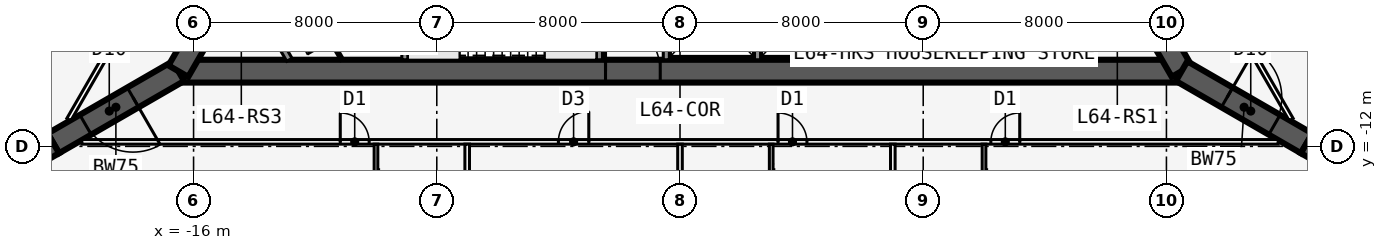
"""IFC4 building model, lengths in metres.
Left out: names, types, materials, properties, quantities, classifications, styles, units other than length and angle.
Written with IfcOpenShell. Run it as: python <this file> out.ifc"""

import sys

from ifc_helpers import new_model, si_unit, direction, frame, frame_2d, origin, place, context, subcontext, project, spatial, polyline, rectangle, outline, extrude, element, fill, save


model = new_model("IFC4")
c1 = context("Model", 3, precision=1e-05, world=origin(), true_north=direction((0.0, 1.0)))
c2 = subcontext(c1, "Body", "Model", "MODEL_VIEW")
j1 = project(units=[si_unit("LENGTHUNIT", "METRE"), si_unit("PLANEANGLEUNIT", "RADIAN")], contexts=[c1])
p1 = place(None, origin())
s1 = spatial("IfcSite", under=j1, at=p1, CompositionType="ELEMENT")
p2 = place(p1, origin())
s2 = spatial("IfcBuilding", under=s1, at=p2, CompositionType="ELEMENT")
p3 = place(p2, frame((0.0, 0.0, 242.9)))
s3 = spatial("IfcBuildingStorey", under=s2, at=p3, CompositionType="ELEMENT", Elevation=242.9)
p4 = place(p3, frame((-16.5, -9.526, 0.0), z_axis=(0.0, 0.0, 1.0), x_axis=(1.0, 0.0, 0.0)))
e1 = element("IfcWall", 1, at=p4, inside=s3, PredefinedType="SHEAR", context=c2, shape_type="SweptSolid", body=[
    extrude(rectangle(XDim=33.0, YDim=0.75, at=frame_2d((16.5, 0.0))), origin(), (0.0, 0.0, 1.0), 3.6),
])
p5 = place(p4, frame((14.05, 0.0, 0.0)))
e2 = element("IfcOpeningElement", 2, at=p5, cuts=e1, PredefinedType="OPENING", context=c2, shape_type="SweptSolid", body=[
    extrude(rectangle(XDim=1.8, YDim=2.13, at=frame_2d((0.9, 1.065))), frame((0.0, 0.385, 0.0), z_axis=(0.0, -1.0, 0.0), x_axis=(1.0, 0.0, 0.0)), (0.0, 0.0, 1.0), 0.77),
])
p6 = place(p3, frame((-9.05, -5.951, 0.0), z_axis=(0.0, 0.0, 1.0), x_axis=(0.0, -1.0, 0.0)))
e3 = element("IfcWall", 3, at=p6, inside=s3, PredefinedType="SOLIDWALL", context=c2, shape_type="SweptSolid", body=[
    extrude(rectangle(XDim=3.2, YDim=0.2, at=frame_2d((1.6, 0.0))), origin(), (0.0, 0.0, 1.0), 3.435),
])
p7 = place(p3, frame((-2.65, -5.951, 0.0), z_axis=(0.0, 0.0, 1.0), x_axis=(0.0, -1.0, 0.0)))
e4 = element("IfcWall", 4, at=p7, inside=s3, PredefinedType="SOLIDWALL", context=c2, shape_type="SweptSolid", body=[
    extrude(rectangle(XDim=3.2, YDim=0.2, at=frame_2d((1.6, 0.0))), origin(), (0.0, 0.0, 1.0), 3.435),
])
p8 = place(p7, frame((1.6, 0.0, 0.0)))
e5 = element("IfcOpeningElement", 5, at=p8, cuts=e4, PredefinedType="OPENING", context=c2, shape_type="SweptSolid", body=[
    extrude(rectangle(XDim=1.0, YDim=2.13, at=frame_2d((0.5, 1.065))), frame((0.0, 0.11, 0.0), z_axis=(0.0, -1.0, 0.0), x_axis=(1.0, 0.0, 0.0)), (0.0, 0.0, 1.0), 0.22),
])
for number, where, z_axis, x_axis in (
    (6, (-0.45, -5.951, 0.0), (0.0, 0.0, 1.0), (0.0, -1.0, 0.0)),
    (7, (2.55, -5.951, 0.0), (0.0, 0.0, 1.0), (0.0, -1.0, 0.0)),
    (8, (5.55, -5.951, 0.0), (0.0, 0.0, 1.0), (0.0, -1.0, 0.0)),
    (9, (8.45, -5.951, 0.0), (0.0, 0.0, 1.0), (0.0, -1.0, 0.0)),
):
    element("IfcWall", number, at=place(p3, frame(where, z_axis=z_axis, x_axis=x_axis)), inside=s3, PredefinedType="SOLIDWALL", context=c2, shape_type="SweptSolid", body=[
        extrude(rectangle(XDim=3.2, YDim=0.2, at=frame_2d((1.6, 0.0))), origin(), (0.0, 0.0, 1.0), 3.435),
    ])
p9 = place(p3, frame((16.5, -9.526, 0.0), z_axis=(0.0, 0.0, 1.0), x_axis=(-0.499999749417, 0.866025548458, 0.0)))
e10 = element("IfcWall", 10, at=p9, inside=s3, PredefinedType="SHEAR", context=c2, shape_type="SweptSolid", body=[
    extrude(rectangle(XDim=33.0, YDim=0.75, at=frame_2d((16.5, 0.0))), origin(), (0.0, 0.0, 1.0), 3.6),
])
p10 = place(p9, frame((14.15, 0.0, 0.0)))
e11 = element("IfcOpeningElement", 11, at=p10, cuts=e10, PredefinedType="OPENING", context=c2, shape_type="SweptSolid", body=[
    extrude(rectangle(XDim=1.8, YDim=2.13, at=frame_2d((0.9, 1.065))), frame((0.0, 0.385, 0.0), z_axis=(0.0, -1.0, 0.0), x_axis=(1.0, 0.0, 0.0)), (0.0, 0.0, 1.0), 0.77),
])
p11 = place(p9, frame((12.6, 0.0, 0.0)))
e12 = element("IfcOpeningElement", 12, at=p11, cuts=e10, PredefinedType="OPENING", context=c2, shape_type="SweptSolid", body=[
    extrude(rectangle(XDim=1.0, YDim=2.13, at=frame_2d((0.5, 1.065))), frame((0.0, 0.385, 0.0), z_axis=(0.0, -1.0, 0.0), x_axis=(1.0, 0.0, 0.0)), (0.0, 0.0, 1.0), 0.77),
])
p12 = place(p3, frame((0.0, 19.052, 0.0), z_axis=(0.0, 0.0, 1.0), x_axis=(-0.499999749417, -0.866025548458, 0.0)))
e13 = element("IfcWall", 13, at=p12, inside=s3, PredefinedType="SHEAR", context=c2, shape_type="SweptSolid", body=[
    extrude(rectangle(XDim=33.0, YDim=0.75, at=frame_2d((16.5, 0.0))), origin(), (0.0, 0.0, 1.0), 3.6),
])
p13 = place(p12, frame((14.15, 0.0, 0.0)))
e14 = element("IfcOpeningElement", 14, at=p13, cuts=e13, PredefinedType="OPENING", context=c2, shape_type="SweptSolid", body=[
    extrude(rectangle(XDim=1.8, YDim=2.13, at=frame_2d((0.9, 1.065))), frame((0.0, 0.385, 0.0), z_axis=(0.0, -1.0, 0.0), x_axis=(1.0, 0.0, 0.0)), (0.0, 0.0, 1.0), 0.77),
])
p14 = place(p12, frame((12.6, 0.0, 0.0)))
e15 = element("IfcOpeningElement", 15, at=p14, cuts=e13, PredefinedType="OPENING", context=c2, shape_type="SweptSolid", body=[
    extrude(rectangle(XDim=1.0, YDim=2.13, at=frame_2d((0.5, 1.065))), frame((0.0, 0.385, 0.0), z_axis=(0.0, -1.0, 0.0), x_axis=(1.0, 0.0, 0.0)), (0.0, 0.0, 1.0), 0.77),
])
p15 = place(p3, frame((16.5, -9.526, 0.0), z_axis=(0.0, 0.0, 1.0), x_axis=(0.866031398331, -0.499989616998, 0.0)))
e16 = element("IfcWall", 16, at=p15, inside=s3, PredefinedType="SHEAR", context=c2, shape_type="SweptSolid", body=[
    extrude(rectangle(XDim=4.746, YDim=0.75, at=frame_2d((2.373, 0.0))), origin(), (0.0, 0.0, 1.0), 3.6),
])
p16 = place(p15, frame((1.725, 0.0, 0.0)))
e17 = element("IfcOpeningElement", 17, at=p16, cuts=e16, PredefinedType="OPENING", context=c2, shape_type="SweptSolid", body=[
    extrude(rectangle(XDim=1.8, YDim=2.13, at=frame_2d((0.9, 1.065))), frame((0.0, 0.385, 0.0), z_axis=(0.0, -1.0, 0.0), x_axis=(1.0, 0.0, 0.0)), (0.0, 0.0, 1.0), 0.77),
])
p17 = place(p3, frame((20.61, -11.899, 0.0), z_axis=(0.0, 0.0, 1.0), x_axis=(0.866009537788, -0.500027479704, 0.0)))
e18 = element("IfcWall", 18, at=p17, inside=s3, PredefinedType="SHEAR", context=c2, shape_type="SweptSolid", body=[
    extrude(rectangle(XDim=1.155, YDim=0.75, at=frame_2d((0.577, 0.0))), origin(), (0.0, 0.0, 1.0), 3.6),
])
p18 = place(p3, frame((-16.5, -9.526, 0.0), z_axis=(0.0, 0.0, 1.0), x_axis=(-0.866031398331, -0.499989616998, 0.0)))
e19 = element("IfcWall", 19, at=p18, inside=s3, PredefinedType="SHEAR", context=c2, shape_type="SweptSolid", body=[
    extrude(rectangle(XDim=4.746, YDim=0.75, at=frame_2d((2.373, 0.0))), origin(), (0.0, 0.0, 1.0), 3.6),
])
p19 = place(p18, frame((1.725, 0.0, 0.0)))
e20 = element("IfcOpeningElement", 20, at=p19, cuts=e19, PredefinedType="OPENING", context=c2, shape_type="SweptSolid", body=[
    extrude(rectangle(XDim=1.8, YDim=2.13, at=frame_2d((0.9, 1.065))), frame((0.0, 0.385, 0.0), z_axis=(0.0, -1.0, 0.0), x_axis=(1.0, 0.0, 0.0)), (0.0, 0.0, 1.0), 0.77),
])
p20 = place(p3, frame((-20.61, -11.899, 0.0), z_axis=(0.0, 0.0, 1.0), x_axis=(-0.866009537788, -0.500027479704, 0.0)))
e21 = element("IfcWall", 21, at=p20, inside=s3, PredefinedType="SHEAR", context=c2, shape_type="SweptSolid", body=[
    extrude(rectangle(XDim=1.155, YDim=0.75, at=frame_2d((0.577, 0.0))), origin(), (0.0, 0.0, 1.0), 3.6),
])
p21 = place(p3, frame((18.46, -15.924, 0.0), z_axis=(0.0, 0.0, 1.0), x_axis=(0.707081252484, 0.707132308968, 0.0)))
e22 = element("IfcWall", 22, at=p21, inside=s3, PredefinedType="SOLIDWALL", context=c2, shape_type="SweptSolid", body=[
    extrude(outline(polyline([(4.782, 0.225), (4.723, 0.225), (4.303, 0.113), (4.273, 0.225), (0.0, 0.225), (0.0, -0.225), (4.782, -0.225), (4.782, 0.225)])), origin(), (0.0, 0.0, 1.0), 3.435),
])
p22 = place(p21, frame((0.711, 0.0, 0.45)))
e23 = element("IfcOpeningElement", 23, at=p22, cuts=e22, PredefinedType="OPENING", context=c2, shape_type="SweptSolid", body=[
    extrude(rectangle(XDim=3.0, YDim=2.6, at=frame_2d((1.5, 1.3))), frame((0.0, 0.235, 0.0), z_axis=(0.0, -1.0, 0.0), x_axis=(1.0, 0.0, 0.0)), (0.0, 0.0, 1.0), 0.47),
])
p23 = place(p3, frame((-21.841, -12.542, 0.0), z_axis=(0.0, 0.0, 1.0), x_axis=(0.707081252484, -0.707132308968, 0.0)))
e24 = element("IfcWall", 24, at=p23, inside=s3, PredefinedType="SOLIDWALL", context=c2, shape_type="SweptSolid", body=[
    extrude(outline(polyline([(4.782, 0.225), (0.509, 0.225), (0.479, 0.113), (0.059, 0.225), (0.0, 0.225), (0.0, -0.225), (4.782, -0.225), (4.782, 0.225)])), origin(), (0.0, 0.0, 1.0), 3.435),
])
p24 = place(p23, frame((1.07, 0.0, 0.45)))
e25 = element("IfcOpeningElement", 25, at=p24, cuts=e24, PredefinedType="OPENING", context=c2, shape_type="SweptSolid", body=[
    extrude(rectangle(XDim=3.0, YDim=2.6, at=frame_2d((1.5, 1.3))), frame((0.0, 0.235, 0.0), z_axis=(0.0, -1.0, 0.0), x_axis=(1.0, 0.0, 0.0)), (0.0, 0.0, 1.0), 0.47),
])
p25 = place(p3, frame((-19.677, -11.851, 0.0), z_axis=(0.0, 0.0, 1.0), x_axis=(1.0, 0.0, 0.0)))
e26 = element("IfcWall", 26, at=p25, inside=s3, PredefinedType="PARTITIONING", context=c2, shape_type="SweptSolid", body=[
    extrude(rectangle(XDim=39.354, YDim=0.15, at=frame_2d((19.677, 0.0))), origin(), (0.0, 0.0, 1.0), 3.435),
])
p26 = place(p25, frame((8.502, 0.0, 0.0)))
e27 = element("IfcOpeningElement", 27, at=p26, cuts=e26, PredefinedType="OPENING", context=c2, shape_type="SweptSolid", body=[
    extrude(rectangle(XDim=0.95, YDim=2.13, at=frame_2d((0.475, 1.065))), frame((0.0, 0.085, 0.0), z_axis=(0.0, -1.0, 0.0), x_axis=(1.0, 0.0, 0.0)), (0.0, 0.0, 1.0), 0.17),
])
p27 = place(p25, frame((15.677, 0.0, 0.0)))
e28 = element("IfcOpeningElement", 28, at=p27, cuts=e26, PredefinedType="OPENING", context=c2, shape_type="SweptSolid", body=[
    extrude(rectangle(XDim=1.0, YDim=2.13, at=frame_2d((0.5, 1.065))), frame((0.0, 0.085, 0.0), z_axis=(0.0, -1.0, 0.0), x_axis=(1.0, 0.0, 0.0)), (0.0, 0.0, 1.0), 0.17),
])
p28 = place(p25, frame((22.902, 0.0, 0.0)))
e29 = element("IfcOpeningElement", 29, at=p28, cuts=e26, PredefinedType="OPENING", context=c2, shape_type="SweptSolid", body=[
    extrude(rectangle(XDim=0.95, YDim=2.13, at=frame_2d((0.475, 1.065))), frame((0.0, 0.085, 0.0), z_axis=(0.0, -1.0, 0.0), x_axis=(1.0, 0.0, 0.0)), (0.0, 0.0, 1.0), 0.17),
])
p29 = place(p25, frame((29.902, 0.0, 0.0)))
e30 = element("IfcOpeningElement", 30, at=p29, cuts=e26, PredefinedType="OPENING", context=c2, shape_type="SweptSolid", body=[
    extrude(rectangle(XDim=0.95, YDim=2.13, at=frame_2d((0.475, 1.065))), frame((0.0, 0.085, 0.0), z_axis=(0.0, -1.0, 0.0), x_axis=(1.0, 0.0, 0.0)), (0.0, 0.0, 1.0), 0.17),
])
p30 = place(p3, frame((-7.0, -11.926, 0.0), z_axis=(0.0, 0.0, 1.0), x_axis=(0.0, -1.0, 0.0)))
e31 = element("IfcWall", 31, at=p30, inside=s3, PredefinedType="PARTITIONING", context=c2, shape_type="SweptSolid", body=[
    extrude(rectangle(XDim=6.609, YDim=0.15, at=frame_2d((3.304, 0.0))), origin(), (0.0, 0.0, 1.0), 2.678),
])
p31 = place(p3, frame((0.0, -11.926, 0.0), z_axis=(0.0, 0.0, 1.0), x_axis=(0.0, -1.0, 0.0)))
e32 = element("IfcWall", 32, at=p31, inside=s3, PredefinedType="PARTITIONING", context=c2, shape_type="SweptSolid", body=[
    extrude(rectangle(XDim=6.854, YDim=0.15, at=frame_2d((3.427, 0.0))), origin(), (0.0, 0.0, 1.0), 2.678),
])
p32 = place(p3, frame((7.0, -11.926, 0.0), z_axis=(0.0, 0.0, 1.0), x_axis=(0.0, -1.0, 0.0)))
e33 = element("IfcWall", 33, at=p32, inside=s3, PredefinedType="PARTITIONING", context=c2, shape_type="SweptSolid", body=[
    extrude(rectangle(XDim=6.609, YDim=0.15, at=frame_2d((3.304, 0.0))), origin(), (0.0, 0.0, 1.0), 2.678),
])
p33 = place(p3, frame((-10.0, -11.926, 0.0), z_axis=(0.0, 0.0, 1.0), x_axis=(0.0, -1.0, 0.0)))
e34 = element("IfcWall", 34, at=p33, inside=s3, PredefinedType="PLUMBINGWALL", context=c2, shape_type="SweptSolid", body=[
    extrude(rectangle(XDim=2.74, YDim=0.12, at=frame_2d((1.37, 0.0))), origin(), (0.0, 0.0, 1.0), 3.435),
])
p34 = place(p33, frame((1.55, 0.0, 0.0)))
e35 = element("IfcOpeningElement", 35, at=p34, cuts=e34, PredefinedType="OPENING", context=c2, shape_type="SweptSolid", body=[
    extrude(rectangle(XDim=0.9, YDim=2.13, at=frame_2d((0.45, 1.065))), frame((0.0, 0.07, 0.0), z_axis=(0.0, -1.0, 0.0), x_axis=(1.0, 0.0, 0.0)), (0.0, 0.0, 1.0), 0.14),
])
p35 = place(p3, frame((3.0, -11.926, 0.0), z_axis=(0.0, 0.0, 1.0), x_axis=(0.0, -1.0, 0.0)))
e36 = element("IfcWall", 36, at=p35, inside=s3, PredefinedType="PLUMBINGWALL", context=c2, shape_type="SweptSolid", body=[
    extrude(rectangle(XDim=2.74, YDim=0.12, at=frame_2d((1.37, 0.0))), origin(), (0.0, 0.0, 1.0), 3.435),
])
p36 = place(p35, frame((1.55, 0.0, 0.0)))
e37 = element("IfcOpeningElement", 37, at=p36, cuts=e36, PredefinedType="OPENING", context=c2, shape_type="SweptSolid", body=[
    extrude(rectangle(XDim=0.9, YDim=2.13, at=frame_2d((0.45, 1.065))), frame((0.0, 0.07, 0.0), z_axis=(0.0, -1.0, 0.0), x_axis=(1.0, 0.0, 0.0)), (0.0, 0.0, 1.0), 0.14),
])
p37 = place(p3, frame((10.0, -11.926, 0.0), z_axis=(0.0, 0.0, 1.0), x_axis=(0.0, -1.0, 0.0)))
e38 = element("IfcWall", 38, at=p37, inside=s3, PredefinedType="PLUMBINGWALL", context=c2, shape_type="SweptSolid", body=[
    extrude(rectangle(XDim=2.74, YDim=0.12, at=frame_2d((1.37, 0.0))), origin(), (0.0, 0.0, 1.0), 3.435),
])
p38 = place(p37, frame((1.55, 0.0, 0.0)))
e39 = element("IfcOpeningElement", 39, at=p38, cuts=e38, PredefinedType="OPENING", context=c2, shape_type="SweptSolid", body=[
    extrude(rectangle(XDim=0.9, YDim=2.13, at=frame_2d((0.45, 1.065))), frame((0.0, 0.07, 0.0), z_axis=(0.0, -1.0, 0.0), x_axis=(1.0, 0.0, 0.0)), (0.0, 0.0, 1.0), 0.14),
])
p39 = place(p3, frame((20.102, -11.115, 0.0), z_axis=(0.0, 0.0, 1.0), x_axis=(-0.500001960654, 0.866024271797, 0.0)))
e40 = element("IfcWall", 40, at=p39, inside=s3, PredefinedType="PARTITIONING", context=c2, shape_type="SweptSolid", body=[
    extrude(rectangle(XDim=12.677, YDim=0.15, at=frame_2d((6.339, 0.0))), origin(), (0.0, 0.0, 1.0), 3.435),
])
p40 = place(p39, frame((8.502, 0.0, 0.0)))
e41 = element("IfcOpeningElement", 41, at=p40, cuts=e40, PredefinedType="OPENING", context=c2, shape_type="SweptSolid", body=[
    extrude(rectangle(XDim=0.95, YDim=2.13, at=frame_2d((0.475, 1.065))), frame((0.0, 0.085, 0.0), z_axis=(0.0, -1.0, 0.0), x_axis=(1.0, 0.0, 0.0)), (0.0, 0.0, 1.0), 0.17),
])
p41 = place(p3, frame((-0.425, 22.966, 0.0), z_axis=(0.0, 0.0, 1.0), x_axis=(-0.500000265775, -0.866025250339, 0.0)))
e42 = element("IfcWall", 42, at=p41, inside=s3, PredefinedType="PARTITIONING", context=c2, shape_type="SweptSolid", body=[
    extrude(rectangle(XDim=39.354, YDim=0.15, at=frame_2d((19.677, 0.0))), origin(), (0.0, 0.0, 1.0), 3.435),
])
p42 = place(p41, frame((8.502, 0.0, 0.0)))
e43 = element("IfcOpeningElement", 43, at=p42, cuts=e42, PredefinedType="OPENING", context=c2, shape_type="SweptSolid", body=[
    extrude(rectangle(XDim=0.95, YDim=2.13, at=frame_2d((0.475, 1.065))), frame((0.0, 0.085, 0.0), z_axis=(0.0, -1.0, 0.0), x_axis=(1.0, 0.0, 0.0)), (0.0, 0.0, 1.0), 0.17),
])
p43 = place(p41, frame((15.902, 0.0, 0.0)))
e44 = element("IfcOpeningElement", 44, at=p43, cuts=e42, PredefinedType="OPENING", context=c2, shape_type="SweptSolid", body=[
    extrude(rectangle(XDim=0.95, YDim=2.13, at=frame_2d((0.475, 1.065))), frame((0.0, 0.085, 0.0), z_axis=(0.0, -1.0, 0.0), x_axis=(1.0, 0.0, 0.0)), (0.0, 0.0, 1.0), 0.17),
])
p44 = place(p41, frame((22.902, 0.0, 0.0)))
e45 = element("IfcOpeningElement", 45, at=p44, cuts=e42, PredefinedType="OPENING", context=c2, shape_type="SweptSolid", body=[
    extrude(rectangle(XDim=0.95, YDim=2.13, at=frame_2d((0.475, 1.065))), frame((0.0, 0.085, 0.0), z_axis=(0.0, -1.0, 0.0), x_axis=(1.0, 0.0, 0.0)), (0.0, 0.0, 1.0), 0.17),
])
p45 = place(p41, frame((29.902, 0.0, 0.0)))
e46 = element("IfcOpeningElement", 46, at=p45, cuts=e42, PredefinedType="OPENING", context=c2, shape_type="SweptSolid", body=[
    extrude(rectangle(XDim=0.95, YDim=2.13, at=frame_2d((0.475, 1.065))), frame((0.0, 0.085, 0.0), z_axis=(0.0, -1.0, 0.0), x_axis=(1.0, 0.0, 0.0)), (0.0, 0.0, 1.0), 0.17),
])
p46 = place(p3, frame((14.349, -6.551, 0.0), z_axis=(0.0, 0.0, 1.0), x_axis=(-0.499952404951, -0.866052881055, 0.0)))
e47 = element("IfcWall", 47, at=p46, inside=s3, PredefinedType="SOLIDWALL", context=c2, shape_type="SweptSolid", body=[
    extrude(rectangle(XDim=3.002, YDim=0.2, at=frame_2d((1.501, 0.0))), origin(), (0.0, 0.0, 1.0), 3.435),
])
p47 = place(p3, frame((12.964, -4.151, 0.0), z_axis=(0.0, 0.0, 1.0), x_axis=(-0.500027479704, -0.866009537788, 0.0)))
e48 = element("IfcWall", 48, at=p47, inside=s3, PredefinedType="PARTITIONING", context=c2, shape_type="SweptSolid", body=[
    extrude(rectangle(XDim=5.774, YDim=0.1, at=frame_2d((2.887, 0.0))), origin(), (0.0, 0.0, 1.0), 3.435),
])
p48 = place(p47, frame((2.437, 0.0, 0.0)))
e49 = element("IfcOpeningElement", 49, at=p48, cuts=e48, PredefinedType="OPENING", context=c2, shape_type="SweptSolid", body=[
    extrude(rectangle(XDim=0.9, YDim=2.13, at=frame_2d((0.45, 1.065))), frame((0.0, 0.06, 0.0), z_axis=(0.0, -1.0, 0.0), x_axis=(1.0, 0.0, 0.0)), (0.0, 0.0, 1.0), 0.12),
])
p49 = place(p3, frame((-12.848, -9.151, 0.0), z_axis=(0.0, 0.0, 1.0), x_axis=(-0.499952404951, 0.866052881055, 0.0)))
e50 = element("IfcWall", 50, at=p49, inside=s3, PredefinedType="SOLIDWALL", context=c2, shape_type="SweptSolid", body=[
    extrude(rectangle(XDim=3.002, YDim=0.2, at=frame_2d((1.501, 0.0))), origin(), (0.0, 0.0, 1.0), 3.435),
])
p50 = place(p3, frame((-11.116, -9.151, 0.0), z_axis=(0.0, 0.0, 1.0), x_axis=(-0.499999210213, 0.866025859768, 0.0)))
e51 = element("IfcWall", 51, at=p50, inside=s3, PredefinedType="PARTITIONING", context=c2, shape_type="SweptSolid", body=[
    extrude(rectangle(XDim=4.734, YDim=0.1, at=frame_2d((2.367, 0.0))), origin(), (0.0, 0.0, 1.0), 3.435),
])
p51 = place(p50, frame((0.734, 0.0, 0.0)))
e52 = element("IfcOpeningElement", 52, at=p51, cuts=e51, PredefinedType="OPENING", context=c2, shape_type="SweptSolid", body=[
    extrude(rectangle(XDim=0.9, YDim=2.13, at=frame_2d((0.45, 1.065))), frame((0.0, 0.06, 0.0), z_axis=(0.0, -1.0, 0.0), x_axis=(1.0, 0.0, 0.0)), (0.0, 0.0, 1.0), 0.12),
])
p52 = place(p26, origin())
e53 = element("IfcDoor", 53, at=p52, inside=s3, OperationType="SINGLE_SWING_LEFT", PredefinedType="DOOR", context=c2, shape_type="SweptSolid", body=[
    extrude(rectangle(XDim=0.95, YDim=2.13, at=frame_2d((0.475, 1.065))), frame((0.0, 0.025, 0.0), z_axis=(0.0, -1.0, 0.0), x_axis=(1.0, 0.0, 0.0)), (0.0, 0.0, 1.0), 0.05),
])
fill(e27, e53)
p53 = place(p27, origin())
e54 = element("IfcDoor", 54, at=p53, inside=s3, OperationType="SINGLE_SWING_RIGHT", PredefinedType="DOOR", context=c2, shape_type="SweptSolid", body=[
    extrude(rectangle(XDim=1.0, YDim=2.13, at=frame_2d((0.5, 1.065))), frame((0.0, 0.025, 0.0), z_axis=(0.0, -1.0, 0.0), x_axis=(1.0, 0.0, 0.0)), (0.0, 0.0, 1.0), 0.05),
])
fill(e28, e54)
p54 = place(p28, origin())
e55 = element("IfcDoor", 55, at=p54, inside=s3, OperationType="SINGLE_SWING_LEFT", PredefinedType="DOOR", context=c2, shape_type="SweptSolid", body=[
    extrude(rectangle(XDim=0.95, YDim=2.13, at=frame_2d((0.475, 1.065))), frame((0.0, 0.025, 0.0), z_axis=(0.0, -1.0, 0.0), x_axis=(1.0, 0.0, 0.0)), (0.0, 0.0, 1.0), 0.05),
])
fill(e29, e55)
p55 = place(p29, origin())
e56 = element("IfcDoor", 56, at=p55, inside=s3, OperationType="SINGLE_SWING_RIGHT", PredefinedType="DOOR", context=c2, shape_type="SweptSolid", body=[
    extrude(rectangle(XDim=0.95, YDim=2.13, at=frame_2d((0.475, 1.065))), frame((0.0, 0.025, 0.0), z_axis=(0.0, -1.0, 0.0), x_axis=(1.0, 0.0, 0.0)), (0.0, 0.0, 1.0), 0.05),
])
fill(e30, e56)
p56 = place(p5, origin())
e57 = element("IfcDoor", 57, at=p56, inside=s3, OperationType="DOUBLE_DOOR_SINGLE_SWING", PredefinedType="DOOR", context=c2, shape_type="SweptSolid", body=[
    extrude(rectangle(XDim=1.8, YDim=2.13, at=frame_2d((0.9, 1.065))), frame((0.0, 0.025, 0.0), z_axis=(0.0, -1.0, 0.0), x_axis=(1.0, 0.0, 0.0)), (0.0, 0.0, 1.0), 0.05),
])
fill(e2, e57)
p57 = place(p16, origin())
e58 = element("IfcDoor", 58, at=p57, inside=s3, OperationType="DOUBLE_DOOR_DOUBLE_SWING", PredefinedType="DOOR", context=c2, shape_type="SweptSolid", body=[
    extrude(rectangle(XDim=1.8, YDim=2.13, at=frame_2d((0.9, 1.065))), frame((0.0, 0.025, 0.0), z_axis=(0.0, -1.0, 0.0), x_axis=(1.0, 0.0, 0.0)), (0.0, 0.0, 1.0), 0.05),
])
fill(e17, e58)
p58 = place(p19, origin())
e59 = element("IfcDoor", 59, at=p58, inside=s3, OperationType="DOUBLE_DOOR_DOUBLE_SWING", PredefinedType="DOOR", context=c2, shape_type="SweptSolid", body=[
    extrude(rectangle(XDim=1.8, YDim=2.13, at=frame_2d((0.9, 1.065))), frame((0.0, 0.025, 0.0), z_axis=(0.0, -1.0, 0.0), x_axis=(1.0, 0.0, 0.0)), (0.0, 0.0, 1.0), 0.05),
])
fill(e20, e59)
save(model, sys.argv[1])
